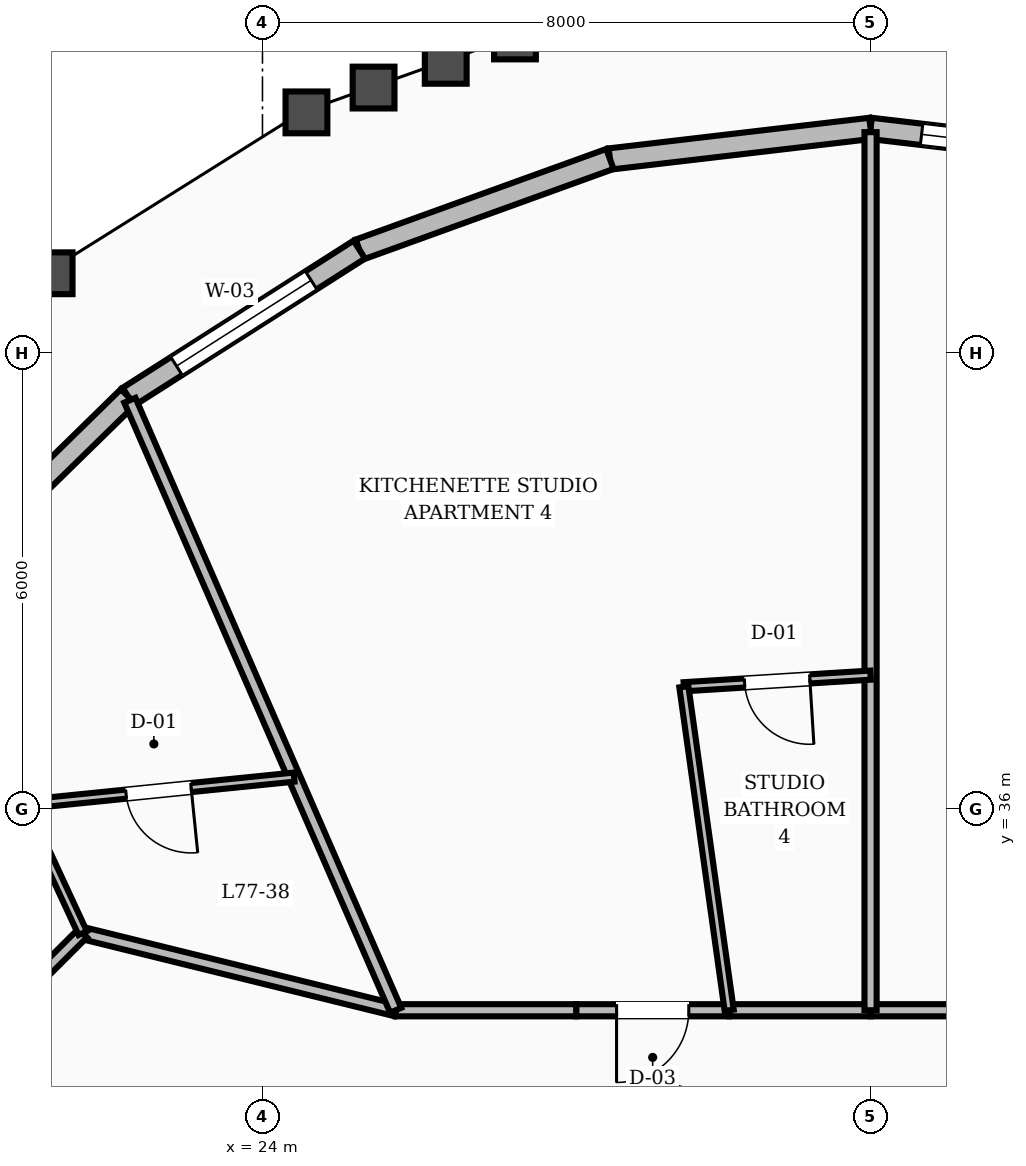
"""IFC4 building model, lengths in metres.
Left out: names, types, materials, properties, quantities, classifications, styles, units other than length and angle.
Written with IfcOpenShell. Run it as: python <this file> out.ifc"""

import sys

from ifc_helpers import new_model, si_unit, direction, frame, frame_2d, origin, place, context, subcontext, project, spatial, rectangle, extrude, element, fill, save


model = new_model("IFC4")
c1 = context("Model", 3, precision=1e-05, world=origin(), true_north=direction((0.0, 1.0)))
c2 = subcontext(c1, "Body", "Model", "MODEL_VIEW")
j1 = project(units=[si_unit("LENGTHUNIT", "METRE"), si_unit("PLANEANGLEUNIT", "RADIAN")], contexts=[c1])
p1 = place(None, origin())
s1 = spatial("IfcSite", under=j1, at=p1, CompositionType="ELEMENT")
p2 = place(p1, origin())
s2 = spatial("IfcBuilding", under=s1, at=p2, CompositionType="ELEMENT")
p3 = place(p2, frame((0.0, 0.0, 294.0)))
s3 = spatial("IfcBuildingStorey", under=s2, at=p3, CompositionType="ELEMENT", Elevation=294.0)
p4 = place(p3, frame((35.429, 44.55, 0.0), z_axis=(0.0, 0.0, 1.0), x_axis=(-0.993178090084, 0.116607381314, 0.0)))
e1 = element("IfcWall", 1, at=p4, inside=s3, PredefinedType="STANDARD", context=c2, shape_type="SweptSolid", body=[
    extrude(rectangle(XDim=3.452, YDim=0.28, at=frame_2d((1.726, 0.0))), origin(), (0.0, 0.0, 1.0), 2.82),
])
p5 = place(p4, frame((0.676, 0.0, 0.8)))
e2 = element("IfcOpeningElement", 2, at=p5, cuts=e1, PredefinedType="OPENING", context=c2, shape_type="SweptSolid", body=[
    extrude(rectangle(XDim=2.1, YDim=1.65, at=frame_2d((1.05, 0.825))), frame((0.0, 0.15, 0.0), z_axis=(0.0, -1.0, 0.0), x_axis=(1.0, 0.0, 0.0)), (0.0, 0.0, 1.0), 0.3),
])
p6 = place(p3, frame((32.0, 44.952, 0.0), z_axis=(0.0, 0.0, 1.0), x_axis=(-0.993178090084, -0.116607381314, 0.0)))
e3 = element("IfcWall", 3, at=p6, inside=s3, PredefinedType="STANDARD", context=c2, shape_type="SweptSolid", body=[
    extrude(rectangle(XDim=3.452, YDim=0.28, at=frame_2d((1.726, 0.0))), origin(), (0.0, 0.0, 1.0), 2.82),
])
p7 = place(p3, frame((28.571, 44.55, 0.0), z_axis=(0.0, 0.0, 1.0), x_axis=(-0.940393758193, -0.340087605703, 0.0)))
e4 = element("IfcWall", 4, at=p7, inside=s3, PredefinedType="STANDARD", context=c2, shape_type="SweptSolid", body=[
    extrude(rectangle(XDim=3.506, YDim=0.28, at=frame_2d((1.753, 0.0))), origin(), (0.0, 0.0, 1.0), 2.82),
])
p8 = place(p3, frame((25.274, 43.357, 0.0), z_axis=(0.0, 0.0, 1.0), x_axis=(-0.843329306989, -0.537397134319, 0.0)))
e5 = element("IfcWall", 5, at=p8, inside=s3, PredefinedType="STANDARD", context=c2, shape_type="SweptSolid", body=[
    extrude(rectangle(XDim=3.603, YDim=0.28, at=frame_2d((1.802, 0.0))), origin(), (0.0, 0.0, 1.0), 2.82),
])
p9 = place(p8, frame((0.752, 0.0, 0.8)))
e6 = element("IfcOpeningElement", 6, at=p9, cuts=e5, PredefinedType="OPENING", context=c2, shape_type="SweptSolid", body=[
    extrude(rectangle(XDim=2.1, YDim=1.65, at=frame_2d((1.05, 0.825))), frame((0.0, 0.15, 0.0), z_axis=(0.0, -1.0, 0.0), x_axis=(1.0, 0.0, 0.0)), (0.0, 0.0, 1.0), 0.3),
])
p10 = place(p3, frame((22.235, 41.421, 0.0), z_axis=(0.0, 0.0, 1.0), x_axis=(-0.714829041056, -0.699299250724, 0.0)))
e7 = element("IfcWall", 7, at=p10, inside=s3, PredefinedType="STANDARD", context=c2, shape_type="SweptSolid", body=[
    extrude(rectangle(XDim=3.726, YDim=0.28, at=frame_2d((1.863, 0.0))), origin(), (0.0, 0.0, 1.0), 2.82),
])
for number, where, z_axis, x_axis in (
    (8, (33.86, 33.35, 0.0), (0.0, 0.0, 1.0), (-1.0, 0.0, 0.0)),
    (9, (32.0, 33.35, 0.0), (0.0, 0.0, 1.0), (-1.0, 0.0, 0.0)),
):
    element("IfcWall", number, at=place(p3, frame(where, z_axis=z_axis, x_axis=x_axis)), inside=s3, PredefinedType="SOLIDWALL", context=c2, shape_type="SweptSolid", body=[
        extrude(rectangle(XDim=1.86, YDim=0.16, at=frame_2d((0.93, 0.0))), origin(), (0.0, 0.0, 1.0), 2.81),
    ])
p11 = place(p3, frame((30.14, 33.35, 0.0), z_axis=(0.0, 0.0, 1.0), x_axis=(-1.0, 0.0, 0.0)))
e10 = element("IfcWall", 10, at=p11, inside=s3, PredefinedType="SOLIDWALL", context=c2, shape_type="SweptSolid", body=[
    extrude(rectangle(XDim=2.013, YDim=0.16, at=frame_2d((1.006, 0.0))), origin(), (0.0, 0.0, 1.0), 2.81),
])
p12 = place(p11, frame((0.531, 0.0, 0.0)))
e11 = element("IfcOpeningElement", 11, at=p12, cuts=e10, PredefinedType="OPENING", context=c2, shape_type="SweptSolid", body=[
    extrude(rectangle(XDim=0.95, YDim=2.1, at=frame_2d((0.475, 1.05))), frame((0.0, 0.09, 0.0), z_axis=(0.0, -1.0, 0.0), x_axis=(1.0, 0.0, 0.0)), (0.0, 0.0, 1.0), 0.18),
])
p13 = place(p3, frame((28.127, 33.35, 0.0), z_axis=(0.0, 0.0, 1.0), x_axis=(-1.0, 0.0, 0.0)))
e12 = element("IfcWall", 12, at=p13, inside=s3, PredefinedType="SOLIDWALL", context=c2, shape_type="SweptSolid", body=[
    extrude(rectangle(XDim=2.375, YDim=0.16, at=frame_2d((1.188, 0.0))), origin(), (0.0, 0.0, 1.0), 2.81),
])
p14 = place(p3, frame((25.752, 33.35, 0.0), z_axis=(0.0, 0.0, 1.0), x_axis=(-0.970939799552, 0.239323850978, 0.0)))
e13 = element("IfcWall", 13, at=p14, inside=s3, PredefinedType="SOLIDWALL", context=c2, shape_type="SweptSolid", body=[
    extrude(rectangle(XDim=4.241, YDim=0.16, at=frame_2d((2.12, 0.0))), origin(), (0.0, 0.0, 1.0), 2.81),
])
p15 = place(p3, frame((21.635, 34.365, 0.0), z_axis=(0.0, 0.0, 1.0), x_axis=(-0.707106781187, -0.707106781187, 0.0)))
e14 = element("IfcWall", 14, at=p15, inside=s3, PredefinedType="SOLIDWALL", context=c2, shape_type="SweptSolid", body=[
    extrude(rectangle(XDim=2.916, YDim=0.16, at=frame_2d((1.458, 0.0))), origin(), (0.0, 0.0, 1.0), 2.81),
])
p16 = place(p15, frame((0.983, 0.0, 0.0)))
e15 = element("IfcOpeningElement", 15, at=p16, cuts=e14, PredefinedType="OPENING", context=c2, shape_type="SweptSolid", body=[
    extrude(rectangle(XDim=0.95, YDim=2.1, at=frame_2d((0.475, 1.05))), frame((0.0, 0.09, 0.0), z_axis=(0.0, -1.0, 0.0), x_axis=(1.0, 0.0, 0.0)), (0.0, 0.0, 1.0), 0.18),
])
p17 = place(p3, frame((32.0, 33.35, 0.0), z_axis=(0.0, 0.0, 1.0), x_axis=(0.0, 1.0, 0.0)))
e16 = element("IfcWall", 16, at=p17, inside=s3, PredefinedType="SOLIDWALL", context=c2, shape_type="SweptSolid", body=[
    extrude(rectangle(XDim=11.552, YDim=0.16, at=frame_2d((5.776, 0.0))), origin(), (0.0, 0.0, 1.0), 2.81),
])
p18 = place(p3, frame((32.0, 37.759, 0.0), z_axis=(0.0, 0.0, 1.0), x_axis=(-0.998063372487, -0.062205341407, 0.0)))
e17 = element("IfcWall", 17, at=p18, inside=s3, PredefinedType="PARTITIONING", context=c2, shape_type="SweptSolid", body=[
    extrude(rectangle(XDim=2.461, YDim=0.12, at=frame_2d((1.23, 0.0))), origin(), (0.0, 0.0, 1.0), 2.81),
])
p19 = place(p18, frame((0.801, 0.0, 0.0)))
e18 = element("IfcOpeningElement", 18, at=p19, cuts=e17, PredefinedType="OPENING", context=c2, shape_type="SweptSolid", body=[
    extrude(rectangle(XDim=0.86, YDim=2.1, at=frame_2d((0.43, 1.05))), frame((0.0, 0.07, 0.0), z_axis=(0.0, -1.0, 0.0), x_axis=(1.0, 0.0, 0.0)), (0.0, 0.0, 1.0), 0.14),
])
p20 = place(p3, frame((30.14, 33.35, 0.0), z_axis=(0.0, 0.0, 1.0), x_axis=(-0.138740342573, 0.990328792545, 0.0)))
e19 = element("IfcWall", 19, at=p20, inside=s3, PredefinedType="PARTITIONING", context=c2, shape_type="SweptSolid", body=[
    extrude(rectangle(XDim=4.297, YDim=0.12, at=frame_2d((2.148, 0.0))), origin(), (0.0, 0.0, 1.0), 2.81),
])
p21 = place(p3, frame((25.752, 33.35, 0.0), z_axis=(0.0, 0.0, 1.0), x_axis=(-0.399482659975, 0.91674075091, 0.0)))
e20 = element("IfcWall", 20, at=p21, inside=s3, PredefinedType="SOLIDWALL", context=c2, shape_type="SweptSolid", body=[
    extrude(rectangle(XDim=8.754, YDim=0.16, at=frame_2d((4.377, 0.0))), origin(), (0.0, 0.0, 1.0), 2.81),
])
p22 = place(p3, frame((24.416, 36.417, 0.0), z_axis=(0.0, 0.0, 1.0), x_axis=(-0.994916385041, -0.100704452615, 0.0)))
e21 = element("IfcWall", 21, at=p22, inside=s3, PredefinedType="PARTITIONING", context=c2, shape_type="SweptSolid", body=[
    extrude(rectangle(XDim=3.583, YDim=0.12, at=frame_2d((1.792, 0.0))), origin(), (0.0, 0.0, 1.0), 2.81),
])
p23 = place(p22, frame((1.362, 0.0, 0.0)))
e22 = element("IfcOpeningElement", 22, at=p23, cuts=e21, PredefinedType="OPENING", context=c2, shape_type="SweptSolid", body=[
    extrude(rectangle(XDim=0.86, YDim=2.1, at=frame_2d((0.43, 1.05))), frame((0.0, 0.07, 0.0), z_axis=(0.0, -1.0, 0.0), x_axis=(1.0, 0.0, 0.0)), (0.0, 0.0, 1.0), 0.14),
])
p24 = place(p3, frame((21.635, 34.365, 0.0), z_axis=(0.0, 0.0, 1.0), x_axis=(-0.42056094126, 0.907264291531, 0.0)))
e23 = element("IfcWall", 23, at=p24, inside=s3, PredefinedType="PARTITIONING", context=c2, shape_type="SweptSolid", body=[
    extrude(rectangle(XDim=1.864, YDim=0.12, at=frame_2d((0.932, 0.0))), origin(), (0.0, 0.0, 1.0), 2.81),
])
p25 = place(p5, origin())
e24 = element("IfcWindow", 24, at=p25, inside=s3, PartitioningType="SINGLE_PANEL", PredefinedType="WINDOW", context=c2, shape_type="SweptSolid", body=[
    extrude(rectangle(XDim=2.1, YDim=1.65, at=frame_2d((1.05, 0.825))), frame((0.0, 0.03, 0.0), z_axis=(0.0, -1.0, 0.0), x_axis=(1.0, 0.0, 0.0)), (0.0, 0.0, 1.0), 0.06),
])
fill(e2, e24)
p26 = place(p9, origin())
e25 = element("IfcWindow", 25, at=p26, inside=s3, PartitioningType="SINGLE_PANEL", PredefinedType="WINDOW", context=c2, shape_type="SweptSolid", body=[
    extrude(rectangle(XDim=2.1, YDim=1.65, at=frame_2d((1.05, 0.825))), frame((0.0, 0.03, 0.0), z_axis=(0.0, -1.0, 0.0), x_axis=(1.0, 0.0, 0.0)), (0.0, 0.0, 1.0), 0.06),
])
fill(e6, e25)
p27 = place(p19, origin())
e26 = element("IfcDoor", 26, at=p27, inside=s3, OperationType="SINGLE_SWING_LEFT", PredefinedType="DOOR", context=c2, shape_type="SweptSolid", body=[
    extrude(rectangle(XDim=0.86, YDim=2.1, at=frame_2d((0.43, 1.05))), frame((0.0, 0.025, 0.0), z_axis=(0.0, -1.0, 0.0), x_axis=(1.0, 0.0, 0.0)), (0.0, 0.0, 1.0), 0.05),
])
fill(e18, e26)
p28 = place(p12, origin())
e27 = element("IfcDoor", 27, at=p28, inside=s3, OperationType="SINGLE_SWING_RIGHT", PredefinedType="DOOR", context=c2, shape_type="SweptSolid", body=[
    extrude(rectangle(XDim=0.95, YDim=2.1, at=frame_2d((0.475, 1.05))), frame((0.0, 0.025, 0.0), z_axis=(0.0, -1.0, 0.0), x_axis=(1.0, 0.0, 0.0)), (0.0, 0.0, 1.0), 0.05),
])
fill(e11, e27)
p29 = place(p23, origin())
e28 = element("IfcDoor", 28, at=p29, inside=s3, OperationType="SINGLE_SWING_LEFT", PredefinedType="DOOR", context=c2, shape_type="SweptSolid", body=[
    extrude(rectangle(XDim=0.86, YDim=2.1, at=frame_2d((0.43, 1.05))), frame((0.0, 0.025, 0.0), z_axis=(0.0, -1.0, 0.0), x_axis=(1.0, 0.0, 0.0)), (0.0, 0.0, 1.0), 0.05),
])
fill(e22, e28)
save(model, sys.argv[1])
